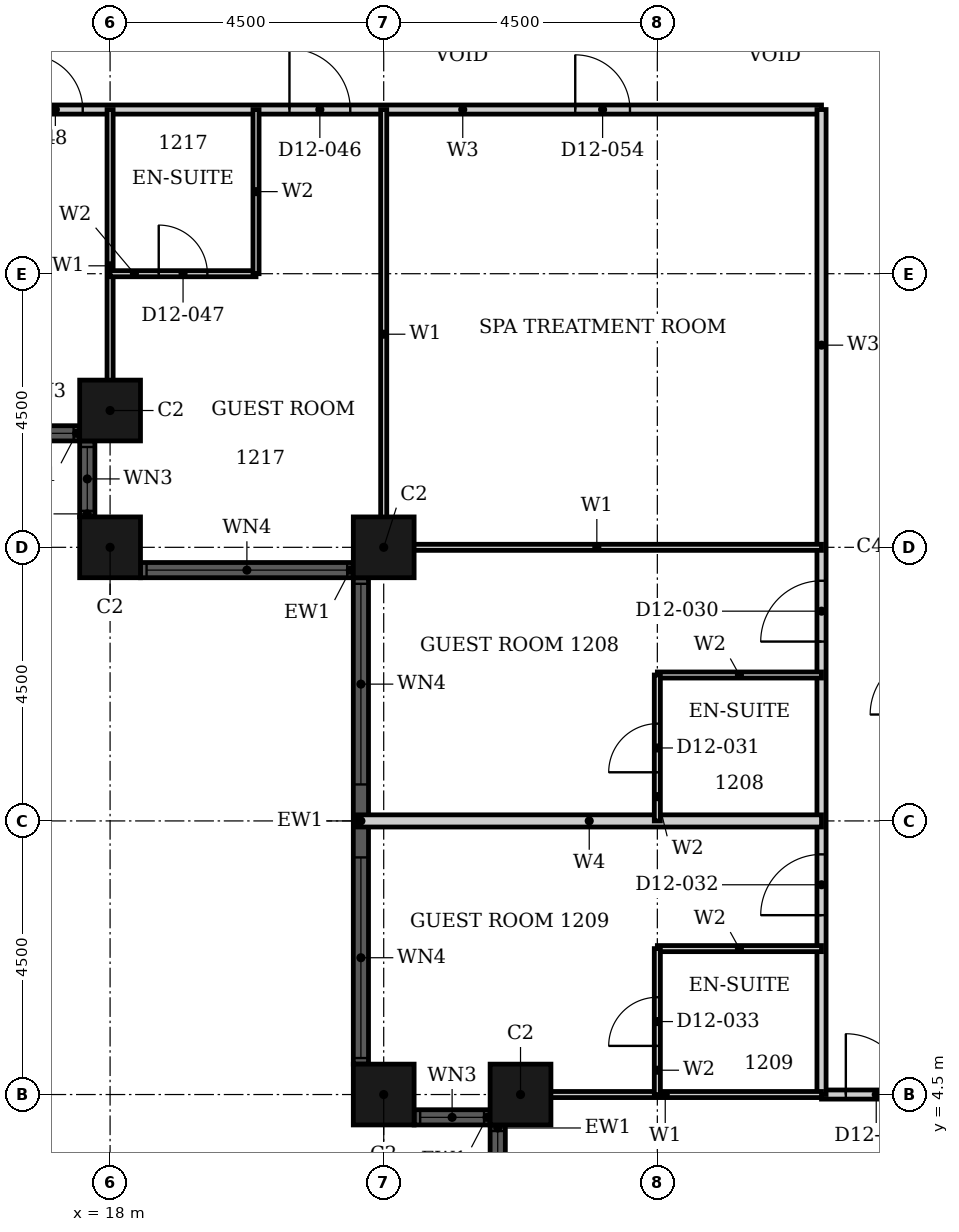
"""IFC4 building model, lengths in metres.
Left out: names, types, materials, properties, quantities, classifications, styles, units other than length and angle.
Written with IfcOpenShell. Run it as: python <this file> out.ifc"""

import sys

from ifc_helpers import new_model, si_unit, direction, frame, frame_2d, origin, origin_2d, place, context, subcontext, project, spatial, rectangle, hollow_rectangle, extrude, element, fill, save


model = new_model("IFC4")
c1 = context("Model", 3, precision=1e-05, world=origin(), true_north=direction((0.0, 1.0)))
c2 = subcontext(c1, "Body", "Model", "MODEL_VIEW")
j1 = project(units=[si_unit("LENGTHUNIT", "METRE"), si_unit("PLANEANGLEUNIT", "RADIAN")], contexts=[c1])
p1 = place(None, origin())
s1 = spatial("IfcSite", under=j1, at=p1, CompositionType="ELEMENT")
p2 = place(p1, origin())
s2 = spatial("IfcBuilding", under=s1, at=p2, CompositionType="ELEMENT")
p3 = place(p2, frame((0.0, 0.0, 56.4)))
s3 = spatial("IfcBuildingStorey", under=s2, at=p3, CompositionType="ELEMENT", Elevation=56.4)
for number, where, z_axis, x_axis in (
    (1, (22.5, 4.5, 0.0), (0.0, 0.0, 1.0), (1.0, 0.0, 0.0)),
    (2, (24.75, 4.5, 0.0), (0.0, 0.0, 1.0), (1.0, 0.0, 0.0)),
    (3, (18.0, 15.75, 0.0), (0.0, 0.0, 1.0), (1.0, 0.0, 0.0)),
    (4, (18.0, 13.5, 0.0), (0.0, 0.0, 1.0), (1.0, 0.0, 0.0)),
    (5, (22.5, 13.5, 0.0), (0.0, 0.0, 1.0), (1.0, 0.0, 0.0)),
):
    element("IfcColumn", number, at=place(p3, frame(where, z_axis=z_axis, x_axis=x_axis)), inside=s3, PredefinedType="COLUMN", context=c2, shape_type="SweptSolid", body=[
        extrude(hollow_rectangle(XDim=1.0, YDim=1.0, WallThickness=0.032, at=origin_2d()), origin(), (0.0, 0.0, 1.0), 3.6),
    ])
p4 = place(p3, frame((23.0, 4.125, 0.0), z_axis=(0.0, 0.0, 1.0), x_axis=(1.0, 0.0, 0.0)))
e6 = element("IfcWall", 6, at=p4, inside=s3, PredefinedType="SOLIDWALL", context=c2, shape_type="SweptSolid", body=[
    extrude(rectangle(XDim=1.25, YDim=0.25, at=frame_2d((0.625, 0.0))), origin(), (0.0, 0.0, 1.0), 3.6),
])
p5 = place(p4, frame((0.1, 0.0, 0.9)))
e7 = element("IfcOpeningElement", 7, at=p5, cuts=e6, PredefinedType="OPENING", context=c2, shape_type="SweptSolid", body=[
    extrude(rectangle(XDim=1.05, YDim=2.08, at=frame_2d((0.525, 1.04))), frame((0.0, 0.135, 0.0), z_axis=(0.0, -1.0, 0.0), x_axis=(1.0, 0.0, 0.0)), (0.0, 0.0, 1.0), 0.27),
])
p6 = place(p3, frame((24.375, 4.0, 0.0), z_axis=(0.0, 0.0, 1.0), x_axis=(0.0, -1.0, 0.0)))
e8 = element("IfcWall", 8, at=p6, inside=s3, PredefinedType="SOLIDWALL", context=c2, shape_type="SweptSolid", body=[
    extrude(rectangle(XDim=1.25, YDim=0.25, at=frame_2d((0.625, 0.0))), origin(), (0.0, 0.0, 1.0), 3.6),
])
p7 = place(p6, frame((0.1, 0.0, 0.9)))
e9 = element("IfcOpeningElement", 9, at=p7, cuts=e8, PredefinedType="OPENING", context=c2, shape_type="SweptSolid", body=[
    extrude(rectangle(XDim=1.05, YDim=2.08, at=frame_2d((0.525, 1.04))), frame((0.0, 0.135, 0.0), z_axis=(0.0, -1.0, 0.0), x_axis=(1.0, 0.0, 0.0)), (0.0, 0.0, 1.0), 0.27),
])
p8 = place(p3, frame((16.25, 15.375, 0.0), z_axis=(0.0, 0.0, 1.0), x_axis=(1.0, 0.0, 0.0)))
e10 = element("IfcWall", 10, at=p8, inside=s3, PredefinedType="SOLIDWALL", context=c2, shape_type="SweptSolid", body=[
    extrude(rectangle(XDim=1.25, YDim=0.25, at=frame_2d((0.625, 0.0))), origin(), (0.0, 0.0, 1.0), 3.6),
])
p9 = place(p8, frame((0.1, 0.0, 0.9)))
e11 = element("IfcOpeningElement", 11, at=p9, cuts=e10, PredefinedType="OPENING", context=c2, shape_type="SweptSolid", body=[
    extrude(rectangle(XDim=1.05, YDim=2.08, at=frame_2d((0.525, 1.04))), frame((0.0, 0.135, 0.0), z_axis=(0.0, -1.0, 0.0), x_axis=(1.0, 0.0, 0.0)), (0.0, 0.0, 1.0), 0.27),
])
p10 = place(p3, frame((17.625, 15.25, 0.0), z_axis=(0.0, 0.0, 1.0), x_axis=(0.0, -1.0, 0.0)))
e12 = element("IfcWall", 12, at=p10, inside=s3, PredefinedType="SOLIDWALL", context=c2, shape_type="SweptSolid", body=[
    extrude(rectangle(XDim=1.25, YDim=0.25, at=frame_2d((0.625, 0.0))), origin(), (0.0, 0.0, 1.0), 3.6),
])
p11 = place(p10, frame((0.1, 0.0, 0.9)))
e13 = element("IfcOpeningElement", 13, at=p11, cuts=e12, PredefinedType="OPENING", context=c2, shape_type="SweptSolid", body=[
    extrude(rectangle(XDim=1.05, YDim=2.08, at=frame_2d((0.525, 1.04))), frame((0.0, 0.135, 0.0), z_axis=(0.0, -1.0, 0.0), x_axis=(1.0, 0.0, 0.0)), (0.0, 0.0, 1.0), 0.27),
])
p12 = place(p3, frame((18.5, 13.125, 0.0), z_axis=(0.0, 0.0, 1.0), x_axis=(1.0, 0.0, 0.0)))
e14 = element("IfcWall", 14, at=p12, inside=s3, PredefinedType="SOLIDWALL", context=c2, shape_type="SweptSolid", body=[
    extrude(rectangle(XDim=3.5, YDim=0.25, at=frame_2d((1.75, 0.0))), origin(), (0.0, 0.0, 1.0), 3.6),
])
p13 = place(p12, frame((0.1, 0.0, 0.9)))
e15 = element("IfcOpeningElement", 15, at=p13, cuts=e14, PredefinedType="OPENING", context=c2, shape_type="SweptSolid", body=[
    extrude(rectangle(XDim=3.3, YDim=2.08, at=frame_2d((1.65, 1.04))), frame((0.0, 0.135, 0.0), z_axis=(0.0, -1.0, 0.0), x_axis=(1.0, 0.0, 0.0)), (0.0, 0.0, 1.0), 0.27),
])
p14 = place(p3, frame((22.125, 13.0, 0.0), z_axis=(0.0, 0.0, 1.0), x_axis=(0.0, -1.0, 0.0)))
e16 = element("IfcWall", 16, at=p14, inside=s3, PredefinedType="SOLIDWALL", context=c2, shape_type="SweptSolid", body=[
    extrude(rectangle(XDim=8.0, YDim=0.25, at=frame_2d((4.0, 0.0))), origin(), (0.0, 0.0, 1.0), 3.6),
])
p15 = place(p14, frame((0.1, 0.0, 0.9)))
e17 = element("IfcOpeningElement", 17, at=p15, cuts=e16, PredefinedType="OPENING", context=c2, shape_type="SweptSolid", body=[
    extrude(rectangle(XDim=3.3, YDim=2.08, at=frame_2d((1.65, 1.04))), frame((0.0, 0.135, 0.0), z_axis=(0.0, -1.0, 0.0), x_axis=(1.0, 0.0, 0.0)), (0.0, 0.0, 1.0), 0.27),
])
p16 = place(p14, frame((4.6, 0.0, 0.9)))
e18 = element("IfcOpeningElement", 18, at=p16, cuts=e16, PredefinedType="OPENING", context=c2, shape_type="SweptSolid", body=[
    extrude(rectangle(XDim=3.3, YDim=2.08, at=frame_2d((1.65, 1.04))), frame((0.0, 0.135, 0.0), z_axis=(0.0, -1.0, 0.0), x_axis=(1.0, 0.0, 0.0)), (0.0, 0.0, 1.0), 0.27),
])
p17 = place(p3, frame((16.2, 20.7, 0.0), z_axis=(0.0, 0.0, 1.0), x_axis=(1.0, 0.0, 0.0)))
e19 = element("IfcWall", 19, at=p17, inside=s3, PredefinedType="PARTITIONING", context=c2, shape_type="SweptSolid", body=[
    extrude(rectangle(XDim=13.5, YDim=0.15, at=frame_2d((6.75, 0.0))), origin(), (0.0, 0.0, 1.0), 3.3),
])
p18 = place(p17, frame((4.75, 0.0, 0.0)))
e20 = element("IfcOpeningElement", 20, at=p18, cuts=e19, PredefinedType="OPENING", context=c2, shape_type="SweptSolid", body=[
    extrude(rectangle(XDim=1.0, YDim=2.1, at=frame_2d((0.5, 1.05))), frame((0.0, 0.085, 0.0), z_axis=(0.0, -1.0, 0.0), x_axis=(1.0, 0.0, 0.0)), (0.0, 0.0, 1.0), 0.17),
])
p19 = place(p17, frame((0.45, 0.0, 0.0)))
e21 = element("IfcOpeningElement", 21, at=p19, cuts=e19, PredefinedType="OPENING", context=c2, shape_type="SweptSolid", body=[
    extrude(rectangle(XDim=0.9, YDim=2.1, at=frame_2d((0.45, 1.05))), frame((0.0, 0.085, 0.0), z_axis=(0.0, -1.0, 0.0), x_axis=(1.0, 0.0, 0.0)), (0.0, 0.0, 1.0), 0.17),
])
p20 = place(p17, frame((9.45, 0.0, 0.0)))
e22 = element("IfcOpeningElement", 22, at=p20, cuts=e19, PredefinedType="OPENING", context=c2, shape_type="SweptSolid", body=[
    extrude(rectangle(XDim=0.9, YDim=2.1, at=frame_2d((0.45, 1.05))), frame((0.0, 0.085, 0.0), z_axis=(0.0, -1.0, 0.0), x_axis=(1.0, 0.0, 0.0)), (0.0, 0.0, 1.0), 0.17),
])
p21 = place(p3, frame((29.7, 4.5, 0.0), z_axis=(0.0, 0.0, 1.0), x_axis=(1.0, 0.0, 0.0)))
e23 = element("IfcWall", 23, at=p21, inside=s3, PredefinedType="PARTITIONING", context=c2, shape_type="SweptSolid", body=[
    extrude(rectangle(XDim=1.8, YDim=0.15, at=frame_2d((0.9, 0.0))), origin(), (0.0, 0.0, 1.0), 3.3),
])
p22 = place(p21, frame((0.4, 0.0, 0.0)))
e24 = element("IfcOpeningElement", 24, at=p22, cuts=e23, PredefinedType="OPENING", context=c2, shape_type="SweptSolid", body=[
    extrude(rectangle(XDim=1.0, YDim=2.1, at=frame_2d((0.5, 1.05))), frame((0.0, 0.085, 0.0), z_axis=(0.0, -1.0, 0.0), x_axis=(1.0, 0.0, 0.0)), (0.0, 0.0, 1.0), 0.17),
])
p23 = place(p3, frame((29.7, 4.5, 0.0), z_axis=(0.0, 0.0, 1.0), x_axis=(0.0, 1.0, 0.0)))
e25 = element("IfcWall", 25, at=p23, inside=s3, PredefinedType="PARTITIONING", context=c2, shape_type="SweptSolid", body=[
    extrude(rectangle(XDim=16.2, YDim=0.15, at=frame_2d((8.1, 0.0))), origin(), (0.0, 0.0, 1.0), 3.3),
])
p24 = place(p23, frame((7.45, 0.0, 0.0)))
e26 = element("IfcOpeningElement", 26, at=p24, cuts=e25, PredefinedType="OPENING", context=c2, shape_type="SweptSolid", body=[
    extrude(rectangle(XDim=1.0, YDim=2.1, at=frame_2d((0.5, 1.05))), frame((0.0, 0.085, 0.0), z_axis=(0.0, -1.0, 0.0), x_axis=(1.0, 0.0, 0.0)), (0.0, 0.0, 1.0), 0.17),
])
p25 = place(p23, frame((2.95, 0.0, 0.0)))
e27 = element("IfcOpeningElement", 27, at=p25, cuts=e25, PredefinedType="OPENING", context=c2, shape_type="SweptSolid", body=[
    extrude(rectangle(XDim=1.0, YDim=2.1, at=frame_2d((0.5, 1.05))), frame((0.0, 0.085, 0.0), z_axis=(0.0, -1.0, 0.0), x_axis=(1.0, 0.0, 0.0)), (0.0, 0.0, 1.0), 0.17),
])
p26 = place(p3, frame((22.31, 13.5, 0.0), z_axis=(0.0, 0.0, 1.0), x_axis=(1.0, 0.0, 0.0)))
e28 = element("IfcWall", 28, at=p26, inside=s3, PredefinedType="PARTITIONING", context=c2, shape_type="SweptSolid", body=[
    extrude(rectangle(XDim=7.39, YDim=0.1, at=frame_2d((3.695, 0.0))), origin(), (0.0, 0.0, 1.0), 2.38),
])
for number, where, z_axis, x_axis in (
    (29, (24.56, 4.5, 0.0), (0.0, 0.0, 1.0), (1.0, 0.0, 0.0)),
    (30, (18.0, 15.56, 0.0), (0.0, 0.0, 1.0), (0.0, 1.0, 0.0)),
):
    element("IfcWall", number, at=place(p3, frame(where, z_axis=z_axis, x_axis=x_axis)), inside=s3, PredefinedType="PARTITIONING", context=c2, shape_type="SweptSolid", body=[
        extrude(rectangle(XDim=5.14, YDim=0.1, at=frame_2d((2.57, 0.0))), origin(), (0.0, 0.0, 1.0), 3.3),
    ])
p27 = place(p3, frame((22.5, 13.31, 0.0), z_axis=(0.0, 0.0, 1.0), x_axis=(0.0, 1.0, 0.0)))
e31 = element("IfcWall", 31, at=p27, inside=s3, PredefinedType="PARTITIONING", context=c2, shape_type="SweptSolid", body=[
    extrude(rectangle(XDim=7.39, YDim=0.1, at=frame_2d((3.695, 0.0))), origin(), (0.0, 0.0, 1.0), 3.3),
])
p28 = place(p3, frame((22.06, 9.0, 0.0), z_axis=(0.0, 0.0, 1.0), x_axis=(1.0, 0.0, 0.0)))
e32 = element("IfcWall", 32, at=p28, inside=s3, PredefinedType="PARTITIONING", context=c2, shape_type="SweptSolid", body=[
    extrude(rectangle(XDim=7.64, YDim=0.2, at=frame_2d((3.82, 0.0))), origin(), (0.0, 0.0, 1.0), 3.3),
])
p29 = place(p3, frame((27.0, 11.4, 0.0), z_axis=(0.0, 0.0, 1.0), x_axis=(1.0, 0.0, 0.0)))
e33 = element("IfcWall", 33, at=p29, inside=s3, PredefinedType="PARTITIONING", context=c2, shape_type="SweptSolid", body=[
    extrude(rectangle(XDim=2.7, YDim=0.1, at=frame_2d((1.35, 0.0))), origin(), (0.0, 0.0, 1.0), 3.3),
])
p30 = place(p3, frame((18.0, 18.0, 0.0), z_axis=(0.0, 0.0, 1.0), x_axis=(1.0, 0.0, 0.0)))
e34 = element("IfcWall", 34, at=p30, inside=s3, PredefinedType="PARTITIONING", context=c2, shape_type="SweptSolid", body=[
    extrude(rectangle(XDim=2.4, YDim=0.1, at=frame_2d((1.2, 0.0))), origin(), (0.0, 0.0, 1.0), 3.3),
])
p31 = place(p30, frame((0.8, 0.0, 0.0)))
e35 = element("IfcOpeningElement", 35, at=p31, cuts=e34, PredefinedType="OPENING", context=c2, shape_type="SweptSolid", body=[
    extrude(rectangle(XDim=0.8, YDim=2.1, at=frame_2d((0.4, 1.05))), frame((0.0, 0.06, 0.0), z_axis=(0.0, -1.0, 0.0), x_axis=(1.0, 0.0, 0.0)), (0.0, 0.0, 1.0), 0.12),
])
for number, where, z_axis, x_axis in (
    (36, (27.0, 6.9, 0.0), (0.0, 0.0, 1.0), (1.0, 0.0, 0.0)),
    (37, (20.4, 18.0, 0.0), (0.0, 0.0, 1.0), (0.0, 1.0, 0.0)),
):
    element("IfcWall", number, at=place(p3, frame(where, z_axis=z_axis, x_axis=x_axis)), inside=s3, PredefinedType="PARTITIONING", context=c2, shape_type="SweptSolid", body=[
        extrude(rectangle(XDim=2.7, YDim=0.1, at=frame_2d((1.35, 0.0))), origin(), (0.0, 0.0, 1.0), 3.3),
    ])
p32 = place(p3, frame((27.0, 9.0, 0.0), z_axis=(0.0, 0.0, 1.0), x_axis=(0.0, 1.0, 0.0)))
e38 = element("IfcWall", 38, at=p32, inside=s3, PredefinedType="PARTITIONING", context=c2, shape_type="SweptSolid", body=[
    extrude(rectangle(XDim=2.4, YDim=0.1, at=frame_2d((1.2, 0.0))), origin(), (0.0, 0.0, 1.0), 2.58),
])
p33 = place(p32, frame((0.8, 0.0, 0.0)))
e39 = element("IfcOpeningElement", 39, at=p33, cuts=e38, PredefinedType="OPENING", context=c2, shape_type="SweptSolid", body=[
    extrude(rectangle(XDim=0.8, YDim=2.1, at=frame_2d((0.4, 1.05))), frame((0.0, 0.06, 0.0), z_axis=(0.0, -1.0, 0.0), x_axis=(1.0, 0.0, 0.0)), (0.0, 0.0, 1.0), 0.12),
])
p34 = place(p3, frame((27.0, 4.5, 0.0), z_axis=(0.0, 0.0, 1.0), x_axis=(0.0, 1.0, 0.0)))
e40 = element("IfcWall", 40, at=p34, inside=s3, PredefinedType="PARTITIONING", context=c2, shape_type="SweptSolid", body=[
    extrude(rectangle(XDim=2.4, YDim=0.1, at=frame_2d((1.2, 0.0))), origin(), (0.0, 0.0, 1.0), 2.58),
])
p35 = place(p34, frame((0.8, 0.0, 0.0)))
e41 = element("IfcOpeningElement", 41, at=p35, cuts=e40, PredefinedType="OPENING", context=c2, shape_type="SweptSolid", body=[
    extrude(rectangle(XDim=0.8, YDim=2.1, at=frame_2d((0.4, 1.05))), frame((0.0, 0.06, 0.0), z_axis=(0.0, -1.0, 0.0), x_axis=(1.0, 0.0, 0.0)), (0.0, 0.0, 1.0), 0.12),
])
p36 = place(p5, origin())
e42 = element("IfcWindow", 42, at=p36, inside=s3, PartitioningType="SINGLE_PANEL", PredefinedType="WINDOW", context=c2, shape_type="SweptSolid", body=[
    extrude(rectangle(XDim=1.05, YDim=2.08, at=frame_2d((0.525, 1.04))), frame((0.0, 0.03, 0.0), z_axis=(0.0, -1.0, 0.0), x_axis=(1.0, 0.0, 0.0)), (0.0, 0.0, 1.0), 0.06),
])
fill(e7, e42)
p37 = place(p7, origin())
e43 = element("IfcWindow", 43, at=p37, inside=s3, PartitioningType="SINGLE_PANEL", PredefinedType="WINDOW", context=c2, shape_type="SweptSolid", body=[
    extrude(rectangle(XDim=1.05, YDim=2.08, at=frame_2d((0.525, 1.04))), frame((0.0, 0.03, 0.0), z_axis=(0.0, -1.0, 0.0), x_axis=(1.0, 0.0, 0.0)), (0.0, 0.0, 1.0), 0.06),
])
fill(e9, e43)
p38 = place(p9, origin())
e44 = element("IfcWindow", 44, at=p38, inside=s3, PartitioningType="SINGLE_PANEL", PredefinedType="WINDOW", context=c2, shape_type="SweptSolid", body=[
    extrude(rectangle(XDim=1.05, YDim=2.08, at=frame_2d((0.525, 1.04))), frame((0.0, 0.03, 0.0), z_axis=(0.0, -1.0, 0.0), x_axis=(1.0, 0.0, 0.0)), (0.0, 0.0, 1.0), 0.06),
])
fill(e11, e44)
p39 = place(p11, origin())
e45 = element("IfcWindow", 45, at=p39, inside=s3, PartitioningType="SINGLE_PANEL", PredefinedType="WINDOW", context=c2, shape_type="SweptSolid", body=[
    extrude(rectangle(XDim=1.05, YDim=2.08, at=frame_2d((0.525, 1.04))), frame((0.0, 0.03, 0.0), z_axis=(0.0, -1.0, 0.0), x_axis=(1.0, 0.0, 0.0)), (0.0, 0.0, 1.0), 0.06),
])
fill(e13, e45)
p40 = place(p13, origin())
e46 = element("IfcWindow", 46, at=p40, inside=s3, PartitioningType="SINGLE_PANEL", PredefinedType="WINDOW", context=c2, shape_type="SweptSolid", body=[
    extrude(rectangle(XDim=3.3, YDim=2.08, at=frame_2d((1.65, 1.04))), frame((0.0, 0.03, 0.0), z_axis=(0.0, -1.0, 0.0), x_axis=(1.0, 0.0, 0.0)), (0.0, 0.0, 1.0), 0.06),
])
fill(e15, e46)
p41 = place(p15, origin())
e47 = element("IfcWindow", 47, at=p41, inside=s3, PartitioningType="SINGLE_PANEL", PredefinedType="WINDOW", context=c2, shape_type="SweptSolid", body=[
    extrude(rectangle(XDim=3.3, YDim=2.08, at=frame_2d((1.65, 1.04))), frame((0.0, 0.03, 0.0), z_axis=(0.0, -1.0, 0.0), x_axis=(1.0, 0.0, 0.0)), (0.0, 0.0, 1.0), 0.06),
])
fill(e17, e47)
p42 = place(p16, origin())
e48 = element("IfcWindow", 48, at=p42, inside=s3, PartitioningType="SINGLE_PANEL", PredefinedType="WINDOW", context=c2, shape_type="SweptSolid", body=[
    extrude(rectangle(XDim=3.3, YDim=2.08, at=frame_2d((1.65, 1.04))), frame((0.0, 0.03, 0.0), z_axis=(0.0, -1.0, 0.0), x_axis=(1.0, 0.0, 0.0)), (0.0, 0.0, 1.0), 0.06),
])
fill(e18, e48)
p43 = place(p24, origin())
e49 = element("IfcDoor", 49, at=p43, inside=s3, OperationType="SINGLE_SWING_RIGHT", PredefinedType="DOOR", context=c2, shape_type="SweptSolid", body=[
    extrude(rectangle(XDim=1.0, YDim=2.1, at=frame_2d((0.5, 1.05))), frame((0.0, 0.025, 0.0), z_axis=(0.0, -1.0, 0.0), x_axis=(1.0, 0.0, 0.0)), (0.0, 0.0, 1.0), 0.05),
])
fill(e26, e49)
p44 = place(p33, origin())
e50 = element("IfcDoor", 50, at=p44, inside=s3, OperationType="SINGLE_SWING_RIGHT", PredefinedType="DOOR", context=c2, shape_type="SweptSolid", body=[
    extrude(rectangle(XDim=0.8, YDim=2.1, at=frame_2d((0.4, 1.05))), frame((0.0, 0.025, 0.0), z_axis=(0.0, -1.0, 0.0), x_axis=(1.0, 0.0, 0.0)), (0.0, 0.0, 1.0), 0.05),
])
fill(e39, e50)
p45 = place(p25, origin())
e51 = element("IfcDoor", 51, at=p45, inside=s3, OperationType="SINGLE_SWING_RIGHT", PredefinedType="DOOR", context=c2, shape_type="SweptSolid", body=[
    extrude(rectangle(XDim=1.0, YDim=2.1, at=frame_2d((0.5, 1.05))), frame((0.0, 0.025, 0.0), z_axis=(0.0, -1.0, 0.0), x_axis=(1.0, 0.0, 0.0)), (0.0, 0.0, 1.0), 0.05),
])
fill(e27, e51)
p46 = place(p35, origin())
e52 = element("IfcDoor", 52, at=p46, inside=s3, OperationType="SINGLE_SWING_RIGHT", PredefinedType="DOOR", context=c2, shape_type="SweptSolid", body=[
    extrude(rectangle(XDim=0.8, YDim=2.1, at=frame_2d((0.4, 1.05))), frame((0.0, 0.025, 0.0), z_axis=(0.0, -1.0, 0.0), x_axis=(1.0, 0.0, 0.0)), (0.0, 0.0, 1.0), 0.05),
])
fill(e41, e52)
p47 = place(p22, origin())
e53 = element("IfcDoor", 53, at=p47, inside=s3, OperationType="SINGLE_SWING_RIGHT", PredefinedType="DOOR", context=c2, shape_type="SweptSolid", body=[
    extrude(rectangle(XDim=1.0, YDim=2.1, at=frame_2d((0.5, 1.05))), frame((0.0, 0.025, 0.0), z_axis=(0.0, -1.0, 0.0), x_axis=(1.0, 0.0, 0.0)), (0.0, 0.0, 1.0), 0.05),
])
fill(e24, e53)
p48 = place(p18, origin())
e54 = element("IfcDoor", 54, at=p48, inside=s3, OperationType="SINGLE_SWING_RIGHT", PredefinedType="DOOR", context=c2, shape_type="SweptSolid", body=[
    extrude(rectangle(XDim=1.0, YDim=2.1, at=frame_2d((0.5, 1.05))), frame((0.0, 0.025, 0.0), z_axis=(0.0, -1.0, 0.0), x_axis=(1.0, 0.0, 0.0)), (0.0, 0.0, 1.0), 0.05),
])
fill(e20, e54)
p49 = place(p31, origin())
e55 = element("IfcDoor", 55, at=p49, inside=s3, OperationType="SINGLE_SWING_RIGHT", PredefinedType="DOOR", context=c2, shape_type="SweptSolid", body=[
    extrude(rectangle(XDim=0.8, YDim=2.1, at=frame_2d((0.4, 1.05))), frame((0.0, 0.025, 0.0), z_axis=(0.0, -1.0, 0.0), x_axis=(1.0, 0.0, 0.0)), (0.0, 0.0, 1.0), 0.05),
])
fill(e35, e55)
p50 = place(p19, origin())
e56 = element("IfcDoor", 56, at=p50, inside=s3, OperationType="SINGLE_SWING_RIGHT", PredefinedType="DOOR", context=c2, shape_type="SweptSolid", body=[
    extrude(rectangle(XDim=0.9, YDim=2.1, at=frame_2d((0.45, 1.05))), frame((0.0, 0.025, 0.0), z_axis=(0.0, -1.0, 0.0), x_axis=(1.0, 0.0, 0.0)), (0.0, 0.0, 1.0), 0.05),
])
fill(e21, e56)
p51 = place(p20, origin())
e57 = element("IfcDoor", 57, at=p51, inside=s3, OperationType="SINGLE_SWING_LEFT", PredefinedType="DOOR", context=c2, shape_type="SweptSolid", body=[
    extrude(rectangle(XDim=0.9, YDim=2.1, at=frame_2d((0.45, 1.05))), frame((0.0, 0.025, 0.0), z_axis=(0.0, -1.0, 0.0), x_axis=(1.0, 0.0, 0.0)), (0.0, 0.0, 1.0), 0.05),
])
fill(e22, e57)
save(model, sys.argv[1])
